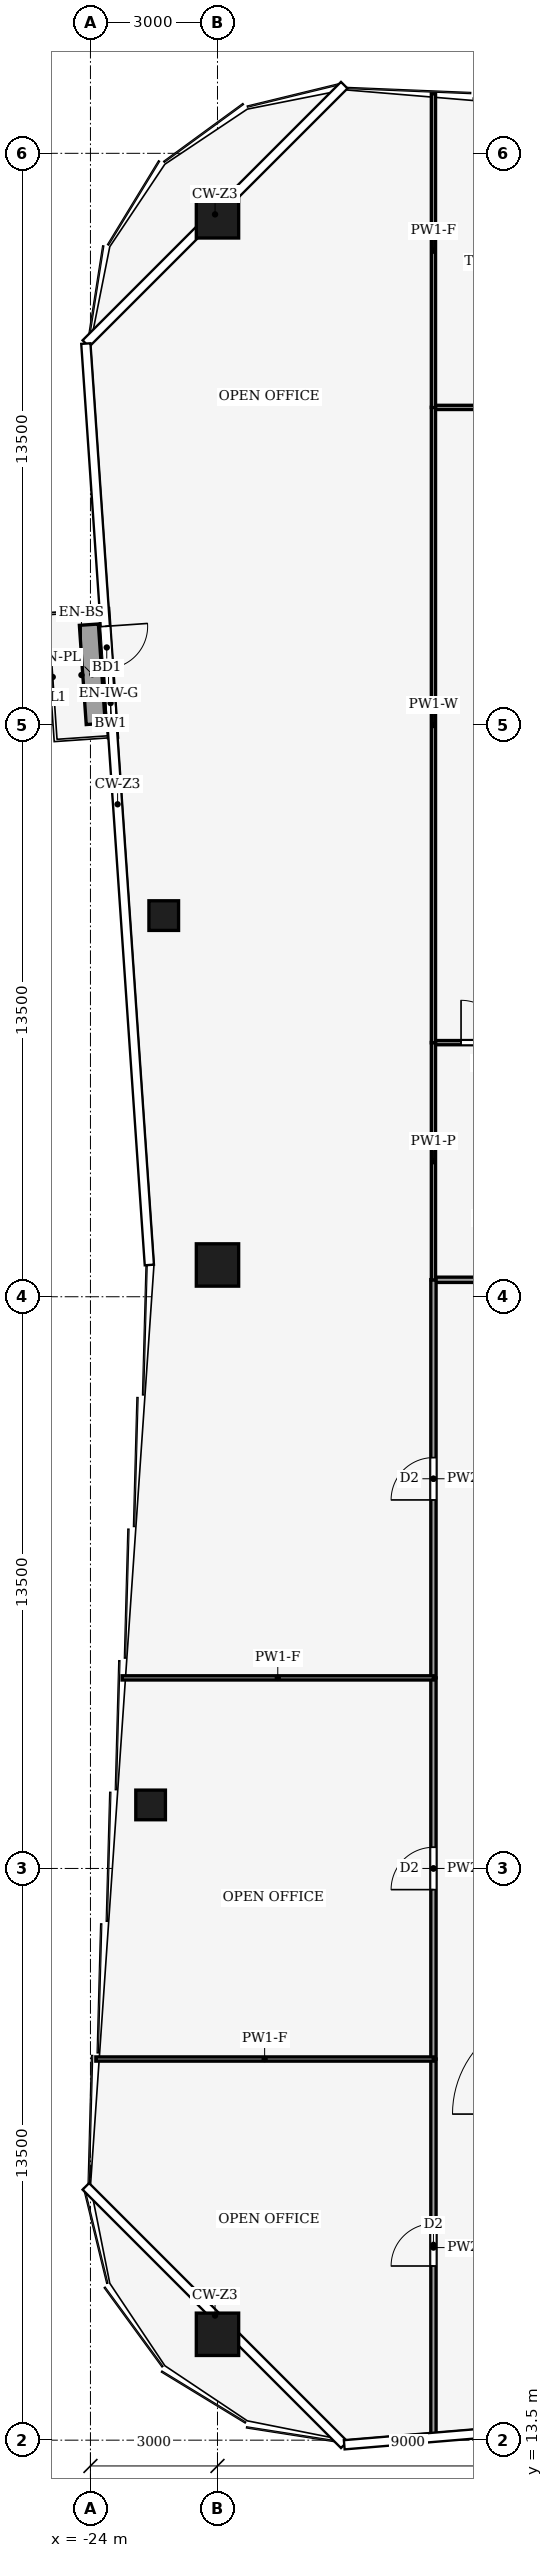
"""IFC4 building model, lengths in metres.
Left out: names, types, materials, properties, quantities, classifications, styles, units other than length and angle.
Written with IfcOpenShell. Run it as: python <this file> out.ifc"""

import sys

from ifc_helpers import new_model, si_unit, direction, frame, frame_2d, origin, origin_2d, place, context, subcontext, project, spatial, rectangle, hollow_rectangle, extrude, element, fill, save


model = new_model("IFC4")
c1 = context("Model", 3, precision=1e-05, world=origin(), true_north=direction((0.0, 1.0)))
c2 = subcontext(c1, "Body", "Model", "MODEL_VIEW")
j1 = project(units=[si_unit("LENGTHUNIT", "METRE"), si_unit("PLANEANGLEUNIT", "RADIAN")], contexts=[c1])
p1 = place(None, origin())
s1 = spatial("IfcSite", under=j1, at=p1, CompositionType="ELEMENT")
p2 = place(p1, origin())
s2 = spatial("IfcBuilding", under=s1, at=p2, CompositionType="ELEMENT")
p3 = place(p2, frame((0.0, 0.0, 214.0)))
s3 = spatial("IfcBuildingStorey", under=s2, at=p3, CompositionType="ELEMENT", Elevation=214.0)
for number, where, z_axis, x_axis in (
    (1, (-21.0, 66.0, 0.0), (0.0, 0.0, 1.0), (1.0, 0.0, 0.0)),
    (2, (-21.0, 16.0, 0.0), (0.0, 0.0, 1.0), (1.0, 0.0, 0.0)),
    (3, (-21.0, 41.25, 0.0), (0.0, 0.0, 1.0), (1.0, 0.0, 0.0)),
):
    element("IfcColumn", number, at=place(p3, frame(where, z_axis=z_axis, x_axis=x_axis)), inside=s3, PredefinedType="COLUMN", context=c2, shape_type="SweptSolid", body=[
        extrude(hollow_rectangle(XDim=1.0, YDim=1.0, WallThickness=0.06, at=origin_2d()), origin(), (0.0, 0.0, 1.0), 4.0),
    ])
for number, where, z_axis, x_axis in (
    (4, (-22.579, 28.5, 0.0), (0.0, 0.0, 1.0), (1.0, 0.0, 0.0)),
    (5, (-22.269, 49.5, 0.0), (0.0, 0.0, 1.0), (1.0, 0.0, 0.0)),
):
    element("IfcColumn", number, at=place(p3, frame(where, z_axis=z_axis, x_axis=x_axis)), inside=s3, PredefinedType="COLUMN", context=c2, shape_type="SweptSolid", body=[
        extrude(hollow_rectangle(XDim=0.7, YDim=0.7, WallThickness=0.03, at=origin_2d()), origin(), (0.0, 0.0, 1.0), 4.0),
    ])
p4 = place(p3, frame((-23.678, 56.745, 0.0), z_axis=(0.0, 0.0, 1.0), x_axis=(0.068793846076, -0.997630897047, 0.0)))
e6 = element("IfcWall", 6, at=p4, inside=s3, PredefinedType="SOLIDWALL", context=c2, shape_type="SweptSolid", body=[
    extrude(rectangle(XDim=3.049, YDim=0.218, at=frame_2d((1.524, 0.0))), origin(), (0.0, 0.0, 1.0), 3.65),
])
p5 = place(p4, frame((0.416, 0.0, 0.0)))
e7 = element("IfcOpeningElement", 7, at=p5, cuts=e6, PredefinedType="OPENING", context=c2, shape_type="SweptSolid", body=[
    extrude(rectangle(XDim=1.0, YDim=2.1, at=frame_2d((0.5, 1.05))), frame((0.0, 0.119, 0.0), z_axis=(0.0, -1.0, 0.0), x_axis=(1.0, 0.0, 0.0)), (0.0, 0.0, 1.0), 0.238),
])
p6 = place(p4, frame((1.832, 0.0, 0.9)))
e8 = element("IfcOpeningElement", 8, at=p6, cuts=e6, PredefinedType="OPENING", context=c2, shape_type="SweptSolid", body=[
    extrude(rectangle(XDim=0.8, YDim=1.2, at=frame_2d((0.4, 0.6))), frame((0.0, 0.119, 0.0), z_axis=(0.0, -1.0, 0.0), x_axis=(1.0, 0.0, 0.0)), (0.0, 0.0, 1.0), 0.238),
])
p7 = place(p3, frame((-24.037, 56.37, 0.0), z_axis=(0.0, 0.0, 1.0), x_axis=(0.068823499363, -0.997628851796, 0.0)))
e9 = element("IfcWall", 9, at=p7, inside=s3, PredefinedType="USERDEFINED", context=c2, shape_type="SweptSolid", body=[
    extrude(rectangle(XDim=2.348, YDim=0.45, at=frame_2d((1.174, 0.0))), origin(), (0.0, 0.0, 1.0), 0.4),
])
p8 = place(p3, frame((-15.9, 40.9, 0.0), z_axis=(0.0, 0.0, 1.0), x_axis=(1.0, 0.0, 0.0)))
e10 = element("IfcWall", 10, at=p8, inside=s3, PredefinedType="PARTITIONING", context=c2, shape_type="SweptSolid", body=[
    extrude(rectangle(XDim=3.9, YDim=0.125, at=frame_2d((1.95, 0.0))), origin(), (0.0, 0.0, 1.0), 3.44),
])
p9 = place(p8, frame((1.45, 0.0, 0.0)))
e11 = element("IfcOpeningElement", 11, at=p9, cuts=e10, PredefinedType="OPENING", context=c2, shape_type="SweptSolid", body=[
    extrude(rectangle(XDim=1.0, YDim=2.1, at=frame_2d((0.5, 1.05))), frame((0.0, 0.073, 0.0), z_axis=(0.0, -1.0, 0.0), x_axis=(1.0, 0.0, 0.0)), (0.0, 0.0, 1.0), 0.145),
])
p10 = place(p3, frame((-15.9, 13.595, 0.0), z_axis=(0.0, 0.0, 1.0), x_axis=(0.0, 1.0, 0.0)))
e12 = element("IfcWall", 12, at=p10, inside=s3, PredefinedType="PARTITIONING", context=c2, shape_type="SweptSolid", body=[
    extrude(rectangle(XDim=8.905, YDim=0.125, at=frame_2d((4.453, 0.0))), origin(), (0.0, 0.0, 1.0), 3.04),
])
p11 = place(p10, frame((4.018, 0.0, 0.0)))
e13 = element("IfcOpeningElement", 13, at=p11, cuts=e12, PredefinedType="OPENING", context=c2, shape_type="SweptSolid", body=[
    extrude(rectangle(XDim=1.0, YDim=2.1, at=frame_2d((0.5, 1.05))), frame((0.0, 0.073, 0.0), z_axis=(0.0, -1.0, 0.0), x_axis=(1.0, 0.0, 0.0)), (0.0, 0.0, 1.0), 0.145),
])
p12 = place(p3, frame((-15.9, 22.5, 0.0), z_axis=(0.0, 0.0, 1.0), x_axis=(0.0, 1.0, 0.0)))
e14 = element("IfcWall", 14, at=p12, inside=s3, PredefinedType="PARTITIONING", context=c2, shape_type="SweptSolid", body=[
    extrude(rectangle(XDim=9.0, YDim=0.125, at=frame_2d((4.5, 0.0))), origin(), (0.0, 0.0, 1.0), 3.44),
])
p13 = place(p12, frame((4.0, 0.0, 0.0)))
e15 = element("IfcOpeningElement", 15, at=p13, cuts=e14, PredefinedType="OPENING", context=c2, shape_type="SweptSolid", body=[
    extrude(rectangle(XDim=1.0, YDim=2.1, at=frame_2d((0.5, 1.05))), frame((0.0, 0.073, 0.0), z_axis=(0.0, -1.0, 0.0), x_axis=(1.0, 0.0, 0.0)), (0.0, 0.0, 1.0), 0.145),
])
p14 = place(p3, frame((-15.9, 31.5, 0.0), z_axis=(0.0, 0.0, 1.0), x_axis=(0.0, 1.0, 0.0)))
e16 = element("IfcWall", 16, at=p14, inside=s3, PredefinedType="PARTITIONING", context=c2, shape_type="SweptSolid", body=[
    extrude(rectangle(XDim=9.404, YDim=0.125, at=frame_2d((4.702, 0.0))), origin(), (0.0, 0.0, 1.0), 3.14),
])
p15 = place(p14, frame((4.202, 0.0, 0.0)))
e17 = element("IfcOpeningElement", 17, at=p15, cuts=e16, PredefinedType="OPENING", context=c2, shape_type="SweptSolid", body=[
    extrude(rectangle(XDim=1.0, YDim=2.1, at=frame_2d((0.5, 1.05))), frame((0.0, 0.073, 0.0), z_axis=(0.0, -1.0, 0.0), x_axis=(1.0, 0.0, 0.0)), (0.0, 0.0, 1.0), 0.145),
])
p16 = place(p3, frame((-15.9, 46.5, 0.0), z_axis=(0.0, 0.0, 1.0), x_axis=(1.0, 0.0, 0.0)))
e18 = element("IfcWall", 18, at=p16, inside=s3, PredefinedType="PARTITIONING", context=c2, shape_type="SweptSolid", body=[
    extrude(rectangle(XDim=3.904, YDim=0.1, at=frame_2d((1.952, 0.0))), origin(), (0.0, 0.0, 1.0), 3.87),
])
p17 = place(p16, frame((0.652, 0.0, 0.0)))
e19 = element("IfcOpeningElement", 19, at=p17, cuts=e18, PredefinedType="OPENING", context=c2, shape_type="SweptSolid", body=[
    extrude(rectangle(XDim=1.0, YDim=2.1, at=frame_2d((0.5, 1.05))), frame((0.0, 0.06, 0.0), z_axis=(0.0, -1.0, 0.0), x_axis=(1.0, 0.0, 0.0)), (0.0, 0.0, 1.0), 0.12),
])
p18 = place(p3, frame((-15.9, 46.504, 0.0), z_axis=(0.0, 0.0, 1.0), x_axis=(0.0, -1.0, 0.0)))
e20 = element("IfcWall", 20, at=p18, inside=s3, PredefinedType="PARTITIONING", context=c2, shape_type="SweptSolid", body=[
    extrude(rectangle(XDim=5.608, YDim=0.1, at=frame_2d((2.804, 0.0))), origin(), (0.0, 0.0, 1.0), 3.44),
])
p19 = place(p3, frame((-15.9, 61.5, 0.0), z_axis=(0.0, 0.0, 1.0), x_axis=(1.0, 0.0, 0.0)))
e21 = element("IfcWall", 21, at=p19, inside=s3, PredefinedType="PARTITIONING", context=c2, shape_type="SweptSolid", body=[
    extrude(rectangle(XDim=12.9, YDim=0.1, at=frame_2d((6.45, 0.0))), origin(), (0.0, 0.0, 1.0), 3.24),
])
p20 = place(p19, frame((5.95, 0.0, 0.0)))
e22 = element("IfcOpeningElement", 22, at=p20, cuts=e21, PredefinedType="OPENING", context=c2, shape_type="SweptSolid", body=[
    extrude(rectangle(XDim=1.0, YDim=2.1, at=frame_2d((0.5, 1.05))), frame((0.0, 0.06, 0.0), z_axis=(0.0, -1.0, 0.0), x_axis=(1.0, 0.0, 0.0)), (0.0, 0.0, 1.0), 0.12),
])
p21 = place(p3, frame((-15.9, 61.504, 0.0), z_axis=(0.0, 0.0, 1.0), x_axis=(0.0, -1.0, 0.0)))
e23 = element("IfcWall", 23, at=p21, inside=s3, PredefinedType="PARTITIONING", context=c2, shape_type="SweptSolid", body=[
    extrude(rectangle(XDim=15.008, YDim=0.1, at=frame_2d((7.504, 0.0))), origin(), (0.0, 0.0, 1.0), 3.24),
])
p22 = place(p3, frame((-15.9, 68.905, 0.0), z_axis=(0.0, 0.0, 1.0), x_axis=(0.0, -1.0, 0.0)))
e24 = element("IfcWall", 24, at=p22, inside=s3, PredefinedType="PARTITIONING", context=c2, shape_type="SweptSolid", body=[
    extrude(rectangle(XDim=7.409, YDim=0.1, at=frame_2d((3.705, 0.0))), origin(), (0.0, 0.0, 1.0), 3.04),
])
p23 = place(p3, frame((-15.9, 22.5, 0.0), z_axis=(0.0, 0.0, 1.0), x_axis=(-1.0, 0.0, 0.0)))
e25 = element("IfcWall", 25, at=p23, inside=s3, PredefinedType="PARTITIONING", context=c2, shape_type="SweptSolid", body=[
    extrude(rectangle(XDim=7.973, YDim=0.1, at=frame_2d((3.987, 0.0))), origin(), (0.0, 0.0, 1.0), 3.04),
])
p24 = place(p3, frame((-15.9, 31.5, 0.0), z_axis=(0.0, 0.0, 1.0), x_axis=(-1.0, 0.0, 0.0)))
e26 = element("IfcWall", 26, at=p24, inside=s3, PredefinedType="PARTITIONING", context=c2, shape_type="SweptSolid", body=[
    extrude(rectangle(XDim=7.353, YDim=0.1, at=frame_2d((3.676, 0.0))), origin(), (0.0, 0.0, 1.0), 3.04),
])
p25 = place(p5, origin())
e27 = element("IfcDoor", 27, at=p25, inside=s3, OperationType="SINGLE_SWING_LEFT", PredefinedType="DOOR", context=c2, shape_type="SweptSolid", body=[
    extrude(rectangle(XDim=1.0, YDim=2.1, at=frame_2d((0.5, 1.05))), frame((0.0, 0.025, 0.0), z_axis=(0.0, -1.0, 0.0), x_axis=(1.0, 0.0, 0.0)), (0.0, 0.0, 1.0), 0.05),
])
fill(e7, e27)
p26 = place(p6, origin())
e28 = element("IfcWindow", 28, at=p26, inside=s3, PartitioningType="SINGLE_PANEL", PredefinedType="WINDOW", context=c2, shape_type="SweptSolid", body=[
    extrude(rectangle(XDim=0.8, YDim=1.2, at=frame_2d((0.4, 0.6))), frame((0.0, 0.03, 0.0), z_axis=(0.0, -1.0, 0.0), x_axis=(1.0, 0.0, 0.0)), (0.0, 0.0, 1.0), 0.06),
])
fill(e8, e28)
p27 = place(p11, origin())
e29 = element("IfcDoor", 29, at=p27, inside=s3, OperationType="SINGLE_SWING_RIGHT", PredefinedType="DOOR", context=c2, shape_type="SweptSolid", body=[
    extrude(rectangle(XDim=1.0, YDim=2.1, at=frame_2d((0.5, 1.05))), frame((0.0, 0.025, 0.0), z_axis=(0.0, -1.0, 0.0), x_axis=(1.0, 0.0, 0.0)), (0.0, 0.0, 1.0), 0.05),
])
fill(e13, e29)
p28 = place(p13, origin())
e30 = element("IfcDoor", 30, at=p28, inside=s3, OperationType="SINGLE_SWING_RIGHT", PredefinedType="DOOR", context=c2, shape_type="SweptSolid", body=[
    extrude(rectangle(XDim=1.0, YDim=2.1, at=frame_2d((0.5, 1.05))), frame((0.0, 0.025, 0.0), z_axis=(0.0, -1.0, 0.0), x_axis=(1.0, 0.0, 0.0)), (0.0, 0.0, 1.0), 0.05),
])
fill(e15, e30)
p29 = place(p15, origin())
e31 = element("IfcDoor", 31, at=p29, inside=s3, OperationType="SINGLE_SWING_LEFT", PredefinedType="DOOR", context=c2, shape_type="SweptSolid", body=[
    extrude(rectangle(XDim=1.0, YDim=2.1, at=frame_2d((0.5, 1.05))), frame((0.0, 0.025, 0.0), z_axis=(0.0, -1.0, 0.0), x_axis=(1.0, 0.0, 0.0)), (0.0, 0.0, 1.0), 0.05),
])
fill(e17, e31)
p30 = place(p17, origin())
e32 = element("IfcDoor", 32, at=p30, inside=s3, OperationType="SINGLE_SWING_LEFT", PredefinedType="DOOR", context=c2, shape_type="SweptSolid", body=[
    extrude(rectangle(XDim=1.0, YDim=2.1, at=frame_2d((0.5, 1.05))), frame((0.0, 0.025, 0.0), z_axis=(0.0, -1.0, 0.0), x_axis=(1.0, 0.0, 0.0)), (0.0, 0.0, 1.0), 0.05),
])
fill(e19, e32)
save(model, sys.argv[1])
